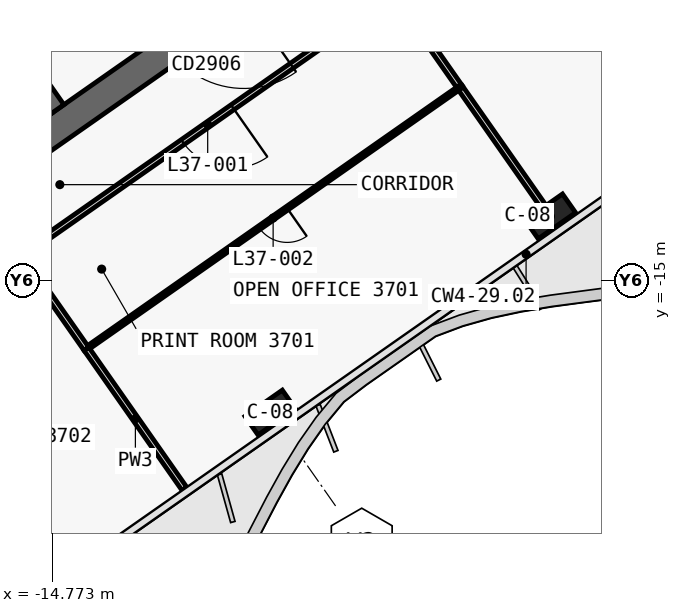
"""IFC4 building model, lengths in metres.
Left out: names, types, materials, properties, quantities, classifications, styles, units other than length and angle.
Written with IfcOpenShell. Run it as: python <this file> out.ifc"""

import sys

from ifc_helpers import new_model, si_unit, direction, frame, frame_2d, origin, origin_2d, place, context, subcontext, project, spatial, polyline, rectangle, outline, extrude, element, fill, save


model = new_model("IFC4")
c1 = context("Model", 3, precision=1e-05, world=origin(), true_north=direction((0.0, 1.0)))
c2 = subcontext(c1, "Body", "Model", "MODEL_VIEW")
j1 = project(units=[si_unit("LENGTHUNIT", "METRE"), si_unit("PLANEANGLEUNIT", "RADIAN")], contexts=[c1])
p1 = place(None, origin())
s1 = spatial("IfcSite", under=j1, at=p1, CompositionType="ELEMENT")
p2 = place(p1, origin())
s2 = spatial("IfcBuilding", under=s1, at=p2, CompositionType="ELEMENT")
p3 = place(p2, frame((0.0, 0.0, 163.2)))
s3 = spatial("IfcBuildingStorey", under=s2, at=p3, CompositionType="ELEMENT", Elevation=163.2)
p4 = place(p3, frame((0.029, -0.712, 0.0), z_axis=(0.0, 0.0, 1.0), x_axis=(-0.819151758019, -0.573576845187, 0.0)))
e1 = element("IfcWall", 1, at=p4, inside=s3, PredefinedType="SHEAR", context=c2, shape_type="SweptSolid", body=[
    extrude(outline(polyline([(26.616, 0.4), (0.56, 0.4), (-0.0, -0.4), (26.616, -0.4), (26.616, 0.4)])), origin(), (0.0, 0.0, 1.0), 3.9),
])
p5 = place(p4, frame((2.966, 0.0, 0.0)))
e2 = element("IfcOpeningElement", 2, at=p5, cuts=e1, PredefinedType="OPENING", context=c2, shape_type="SweptSolid", body=[
    extrude(rectangle(XDim=2.4, YDim=2.1, at=frame_2d((1.2, 1.05))), frame((0.0, 0.41, 0.0), z_axis=(0.0, -1.0, 0.0), x_axis=(1.0, 0.0, 0.0)), (0.0, 0.0, 1.0), 0.82),
])
p6 = place(p4, frame((11.916, 0.0, 0.0)))
e3 = element("IfcOpeningElement", 3, at=p6, cuts=e1, PredefinedType="OPENING", context=c2, shape_type="SweptSolid", body=[
    extrude(rectangle(XDim=2.4, YDim=2.1, at=frame_2d((1.2, 1.05))), frame((0.0, 0.41, 0.0), z_axis=(0.0, -1.0, 0.0), x_axis=(1.0, 0.0, 0.0)), (0.0, 0.0, 1.0), 0.82),
])
p7 = place(p3, frame((-14.63, -10.488, 0.0), z_axis=(0.0, 0.0, 1.0), x_axis=(-0.573611936273, 0.819127185829, 0.0)))
e4 = element("IfcWall", 4, at=p7, inside=s3, PredefinedType="SHEAR", context=c2, shape_type="SweptSolid", body=[
    extrude(outline(polyline([(4.6, 0.2), (0.0, 0.2), (0.0, -0.2), (4.6, -0.2), (4.6, 0.2)])), origin(), (0.0, 0.0, 1.0), 3.9),
])
p8 = place(p3, frame((-2.638, 3.768, 0.0), z_axis=(0.0, 0.0, 1.0), x_axis=(-0.81915267502, -0.573575535572, 0.0)))
e5 = element("IfcWall", 5, at=p8, inside=s3, PredefinedType="SHEAR", context=c2, shape_type="SweptSolid", body=[
    extrude(outline(polyline([(26.2, 0.2), (0.0, 0.2), (0.0, -0.2), (26.2, -0.2), (26.2, 0.2)])), origin(), (0.0, 0.0, 1.0), 3.9),
])
p9 = place(p8, frame((1.169, 0.0, 0.0)))
e6 = element("IfcOpeningElement", 6, at=p9, cuts=e5, PredefinedType="OPENING", context=c2, shape_type="SweptSolid", body=[
    extrude(rectangle(XDim=1.1, YDim=2.1, at=frame_2d((0.55, 1.05))), frame((0.0, 0.21, 0.0), z_axis=(0.0, -1.0, 0.0), x_axis=(1.0, 0.0, 0.0)), (0.0, 0.0, 1.0), 0.42),
])
p10 = place(p8, frame((3.206, 0.0, 0.0)))
e7 = element("IfcOpeningElement", 7, at=p10, cuts=e5, PredefinedType="OPENING", context=c2, shape_type="SweptSolid", body=[
    extrude(rectangle(XDim=1.1, YDim=2.1, at=frame_2d((0.55, 1.05))), frame((0.0, 0.21, 0.0), z_axis=(0.0, -1.0, 0.0), x_axis=(1.0, 0.0, 0.0)), (0.0, 0.0, 1.0), 0.42),
])
p11 = place(p8, frame((5.244, 0.0, 0.0)))
e8 = element("IfcOpeningElement", 8, at=p11, cuts=e5, PredefinedType="OPENING", context=c2, shape_type="SweptSolid", body=[
    extrude(rectangle(XDim=1.1, YDim=2.1, at=frame_2d((0.55, 1.05))), frame((0.0, 0.21, 0.0), z_axis=(0.0, -1.0, 0.0), x_axis=(1.0, 0.0, 0.0)), (0.0, 0.0, 1.0), 0.42),
])
p12 = place(p8, frame((7.281, 0.0, 0.0)))
e9 = element("IfcOpeningElement", 9, at=p12, cuts=e5, PredefinedType="OPENING", context=c2, shape_type="SweptSolid", body=[
    extrude(rectangle(XDim=1.1, YDim=2.1, at=frame_2d((0.55, 1.05))), frame((0.0, 0.21, 0.0), z_axis=(0.0, -1.0, 0.0), x_axis=(1.0, 0.0, 0.0)), (0.0, 0.0, 1.0), 0.42),
])
p13 = place(p8, frame((9.688, 0.0, 0.0)))
e10 = element("IfcOpeningElement", 10, at=p13, cuts=e5, PredefinedType="OPENING", context=c2, shape_type="SweptSolid", body=[
    extrude(rectangle(XDim=1.1, YDim=2.1, at=frame_2d((0.55, 1.05))), frame((0.0, 0.21, 0.0), z_axis=(0.0, -1.0, 0.0), x_axis=(1.0, 0.0, 0.0)), (0.0, 0.0, 1.0), 0.42),
])
p14 = place(p8, frame((11.863, 0.0, 0.0)))
e11 = element("IfcOpeningElement", 11, at=p14, cuts=e5, PredefinedType="OPENING", context=c2, shape_type="SweptSolid", body=[
    extrude(rectangle(XDim=1.1, YDim=2.1, at=frame_2d((0.55, 1.05))), frame((0.0, 0.21, 0.0), z_axis=(0.0, -1.0, 0.0), x_axis=(1.0, 0.0, 0.0)), (0.0, 0.0, 1.0), 0.42),
])
p15 = place(p8, frame((14.038, 0.0, 0.0)))
e12 = element("IfcOpeningElement", 12, at=p15, cuts=e5, PredefinedType="OPENING", context=c2, shape_type="SweptSolid", body=[
    extrude(rectangle(XDim=1.1, YDim=2.1, at=frame_2d((0.55, 1.05))), frame((0.0, 0.21, 0.0), z_axis=(0.0, -1.0, 0.0), x_axis=(1.0, 0.0, 0.0)), (0.0, 0.0, 1.0), 0.42),
])
p16 = place(p8, frame((16.212, 0.0, 0.0)))
e13 = element("IfcOpeningElement", 13, at=p16, cuts=e5, PredefinedType="OPENING", context=c2, shape_type="SweptSolid", body=[
    extrude(rectangle(XDim=1.1, YDim=2.1, at=frame_2d((0.55, 1.05))), frame((0.0, 0.21, 0.0), z_axis=(0.0, -1.0, 0.0), x_axis=(1.0, 0.0, 0.0)), (0.0, 0.0, 1.0), 0.42),
])
for number, where, z_axis, x_axis in (
    (14, (-1.665, -13.313, 0.0), (0.0, 0.0, 1.0), (-0.819, -0.574, 0.0)),
    (15, (-9.038, -18.475, 0.0), (0.0, 0.0, 1.0), (-0.819, -0.574, 0.0)),
):
    element("IfcColumn", number, at=place(p3, frame(where, z_axis=z_axis, x_axis=x_axis)), inside=s3, PredefinedType="COLUMN", context=c2, shape_type="SweptSolid", body=[
        extrude(rectangle(XDim=1.2, YDim=0.6, at=origin_2d()), origin(), (0.0, 0.0, 1.0), 3.9),
    ])
p17 = place(p3, frame((-5.766, -7.456, 0.0), z_axis=(0.0, 0.0, 1.0), x_axis=(-0.81915546166, -0.573571555809, 0.0)))
e16 = element("IfcWall", 16, at=p17, inside=s3, PredefinedType="PARTITIONING", context=c2, shape_type="SweptSolid", body=[
    extrude(rectangle(XDim=12.002, YDim=0.15, at=frame_2d((6.001, 0.0))), origin(), (0.0, 0.0, 1.0), 3.0),
])
p18 = place(p17, frame((5.201, 0.0, 0.0)))
e17 = element("IfcOpeningElement", 17, at=p18, cuts=e16, PredefinedType="OPENING", context=c2, shape_type="SweptSolid", body=[
    extrude(rectangle(XDim=1.6, YDim=2.1, at=frame_2d((0.8, 1.05))), frame((0.0, 0.085, 0.0), z_axis=(0.0, -1.0, 0.0), x_axis=(1.0, 0.0, 0.0)), (0.0, 0.0, 1.0), 0.17),
])
p19 = place(p3, frame((-1.849, -13.051, 0.0), z_axis=(0.0, 0.0, 1.0), x_axis=(-0.573586379587, 0.81914508187, 0.0)))
e18 = element("IfcWall", 18, at=p19, inside=s3, PredefinedType="PARTITIONING", context=c2, shape_type="SweptSolid", body=[
    extrude(rectangle(XDim=3.831, YDim=0.15, at=frame_2d((1.916, 0.0))), origin(), (0.0, 0.0, 1.0), 3.0),
])
p20 = place(p3, frame((-4.044, -9.915, 0.0), z_axis=(0.0, 0.0, 1.0), x_axis=(-0.573609604409, 0.819128818764, 0.0)))
e19 = element("IfcWall", 19, at=p20, inside=s3, PredefinedType="PARTITIONING", context=c2, shape_type="SweptSolid", body=[
    extrude(rectangle(XDim=3.004, YDim=0.15, at=frame_2d((1.502, 0.0))), origin(), (0.0, 0.0, 1.0), 3.0),
])
p21 = place(p3, frame((-4.045, -9.914, 0.0), z_axis=(0.0, 0.0, 1.0), x_axis=(-0.819146845232, -0.573583861302, 0.0)))
e20 = element("IfcWall", 20, at=p21, inside=s3, PredefinedType="PARTITIONING", context=c2, shape_type="SweptSolid", body=[
    extrude(rectangle(XDim=12.0, YDim=0.1, at=frame_2d((6.0, 0.0))), origin(), (0.0, 0.0, 1.0), 3.0),
])
p22 = place(p21, frame((5.55, 0.0, 0.0)))
e21 = element("IfcOpeningElement", 21, at=p22, cuts=e20, PredefinedType="OPENING", context=c2, shape_type="SweptSolid", body=[
    extrude(rectangle(XDim=0.9, YDim=2.1, at=frame_2d((0.45, 1.05))), frame((0.0, 0.06, 0.0), z_axis=(0.0, -1.0, 0.0), x_axis=(1.0, 0.0, 0.0)), (0.0, 0.0, 1.0), 0.12),
])
p23 = place(p3, frame((-11.294, -20.482, 0.0), z_axis=(0.0, 0.0, 1.0), x_axis=(-0.573589807488, 0.819142681555, 0.0)))
e22 = element("IfcWall", 22, at=p23, inside=s3, PredefinedType="PARTITIONING", context=c2, shape_type="SweptSolid", body=[
    extrude(rectangle(XDim=4.499, YDim=0.15, at=frame_2d((2.25, 0.0))), origin(), (0.0, 0.0, 1.0), 2.9),
])
p24 = place(p3, frame((-13.875, -16.796, 0.0), z_axis=(0.0, 0.0, 1.0), x_axis=(-0.573560650686, 0.819163097304, 0.0)))
e23 = element("IfcWall", 23, at=p24, inside=s3, PredefinedType="PARTITIONING", context=c2, shape_type="SweptSolid", body=[
    extrude(rectangle(XDim=3.0, YDim=0.15, at=frame_2d((1.5, 0.0))), origin(), (0.0, 0.0, 1.0), 3.62),
])
p25 = place(p18, origin())
e24 = element("IfcDoor", 24, at=p25, inside=s3, OperationType="DOUBLE_DOOR_SINGLE_SWING", PredefinedType="DOOR", context=c2, shape_type="SweptSolid", body=[
    extrude(rectangle(XDim=1.6, YDim=2.1, at=frame_2d((0.8, 1.05))), frame((0.0, 0.025, 0.0), z_axis=(0.0, -1.0, 0.0), x_axis=(1.0, 0.0, 0.0)), (0.0, 0.0, 1.0), 0.05),
])
fill(e17, e24)
p26 = place(p22, origin())
e25 = element("IfcDoor", 25, at=p26, inside=s3, OperationType="SINGLE_SWING_RIGHT", PredefinedType="DOOR", context=c2, shape_type="SweptSolid", body=[
    extrude(rectangle(XDim=0.9, YDim=2.1, at=frame_2d((0.45, 1.05))), frame((0.0, 0.025, 0.0), z_axis=(0.0, -1.0, 0.0), x_axis=(1.0, 0.0, 0.0)), (0.0, 0.0, 1.0), 0.05),
])
fill(e21, e25)
save(model, sys.argv[1])
